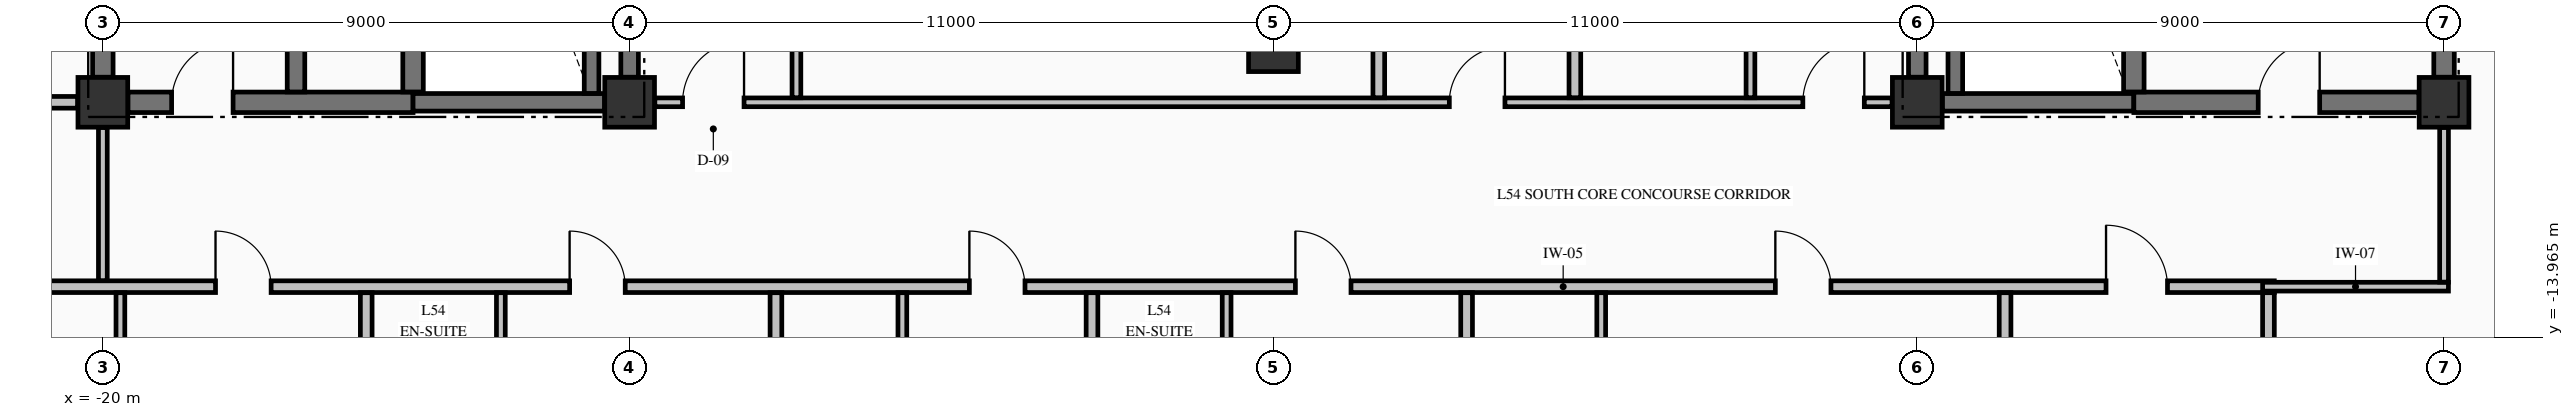
"""IFC4 building model, lengths in metres.
Left out: names, types, materials, properties, quantities, classifications, styles, units other than length and angle.
Written with IfcOpenShell. Run it as: python <this file> out.ifc"""

import sys

from ifc_helpers import new_model, si_unit, direction, frame, frame_2d, origin, origin_2d, place, context, subcontext, project, spatial, rectangle, extrude, element, fill, save


model = new_model("IFC4")
c1 = context("Model", 3, precision=1e-05, world=origin(), true_north=direction((0.0, 1.0)))
c2 = subcontext(c1, "Body", "Model", "MODEL_VIEW")
j1 = project(units=[si_unit("LENGTHUNIT", "METRE"), si_unit("PLANEANGLEUNIT", "RADIAN")], contexts=[c1])
p1 = place(None, origin())
s1 = spatial("IfcSite", under=j1, at=p1, CompositionType="ELEMENT")
p2 = place(p1, origin())
s2 = spatial("IfcBuilding", under=s1, at=p2, CompositionType="ELEMENT")
p3 = place(p2, frame((0.0, 0.0, 208.46)))
s3 = spatial("IfcBuildingStorey", under=s2, at=p3, CompositionType="ELEMENT", Elevation=208.46)
for number, where, z_axis, x_axis in (
    (1, (-20.0, -9.95, -0.25), (0.0, 0.0, 1.0), (1.0, 0.0, 0.0)),
    (2, (-11.0, -9.95, -0.25), (0.0, 0.0, 1.0), (1.0, 0.0, 0.0)),
    (3, (11.0, -9.95, -0.25), (0.0, 0.0, 1.0), (1.0, 0.0, 0.0)),
    (4, (20.0, -9.95, -0.25), (0.0, 0.0, 1.0), (1.0, 0.0, 0.0)),
    (5, (0.0, -9.0, -0.25), (0.0, 0.0, 1.0), (1.0, 0.0, 0.0)),
):
    element("IfcColumn", number, at=place(p3, frame(where, z_axis=z_axis, x_axis=x_axis)), inside=s3, PredefinedType="COLUMN", context=c2, shape_type="SweptSolid", body=[
        extrude(rectangle(XDim=0.85, YDim=0.85, at=origin_2d()), origin(), (0.0, 0.0, 1.0), 3.325),
    ])
p4 = place(p3, frame((-19.571, -9.95, 0.0), z_axis=(0.0, 0.0, 1.0), x_axis=(1.0, 0.0, 0.0)))
e6 = element("IfcWall", 6, at=p4, inside=s3, PredefinedType="SHEAR", context=c2, shape_type="SweptSolid", body=[
    extrude(rectangle(XDim=4.871, YDim=0.35, at=frame_2d((2.436, 0.0))), origin(), (0.0, 0.0, 1.0), 3.075),
])
p5 = place(p4, frame((0.746, 0.0, 0.0)))
e7 = element("IfcOpeningElement", 7, at=p5, cuts=e6, PredefinedType="OPENING", context=c2, shape_type="SweptSolid", body=[
    extrude(rectangle(XDim=1.05, YDim=2.15, at=frame_2d((0.525, 1.075))), frame((0.0, 0.185, 0.0), z_axis=(0.0, -1.0, 0.0), x_axis=(1.0, 0.0, 0.0)), (0.0, 0.0, 1.0), 0.37),
])
for number, where, z_axis, x_axis in (
    (8, (-14.7, -9.95, 0.0), (0.0, 0.0, 1.0), (1.0, 0.0, 0.0)),
    (9, (11.429, -9.95, 0.0), (0.0, 0.0, 1.0), (1.0, 0.0, 0.0)),
):
    element("IfcWall", number, at=place(p3, frame(where, z_axis=z_axis, x_axis=x_axis)), inside=s3, PredefinedType="SHEAR", context=c2, shape_type="SweptSolid", body=[
        extrude(rectangle(XDim=3.271, YDim=0.3, at=frame_2d((1.635, 0.0))), origin(), (0.0, 0.0, 1.0), 3.075),
    ])
p6 = place(p3, frame((14.7, -9.95, 0.0), z_axis=(0.0, 0.0, 1.0), x_axis=(1.0, 0.0, 0.0)))
e10 = element("IfcWall", 10, at=p6, inside=s3, PredefinedType="SHEAR", context=c2, shape_type="SweptSolid", body=[
    extrude(rectangle(XDim=4.871, YDim=0.35, at=frame_2d((2.436, 0.0))), origin(), (0.0, 0.0, 1.0), 3.075),
])
p7 = place(p6, frame((2.125, 0.0, 0.0)))
e11 = element("IfcOpeningElement", 11, at=p7, cuts=e10, PredefinedType="OPENING", context=c2, shape_type="SweptSolid", body=[
    extrude(rectangle(XDim=1.05, YDim=2.15, at=frame_2d((0.525, 1.075))), frame((0.0, 0.185, 0.0), z_axis=(0.0, -1.0, 0.0), x_axis=(1.0, 0.0, 0.0)), (0.0, 0.0, 1.0), 0.37),
])
p8 = place(p3, frame((-22.1, -13.1, 0.0), z_axis=(0.0, 0.0, 1.0), x_axis=(1.0, 0.0, 0.0)))
e12 = element("IfcWall", 12, at=p8, inside=s3, PredefinedType="PARTITIONING", context=c2, shape_type="SweptSolid", body=[
    extrude(rectangle(XDim=39.2, YDim=0.2, at=frame_2d((19.6, 0.0))), origin(), (0.0, 0.0, 1.0), 3.075),
])
p9 = place(p8, frame((4.025, 0.0, 0.0)))
e13 = element("IfcOpeningElement", 13, at=p9, cuts=e12, PredefinedType="OPENING", context=c2, shape_type="SweptSolid", body=[
    extrude(rectangle(XDim=0.95, YDim=2.15, at=frame_2d((0.475, 1.075))), frame((0.0, 0.11, 0.0), z_axis=(0.0, -1.0, 0.0), x_axis=(1.0, 0.0, 0.0)), (0.0, 0.0, 1.0), 0.22),
])
p10 = place(p8, frame((10.075, 0.0, 0.0)))
e14 = element("IfcOpeningElement", 14, at=p10, cuts=e12, PredefinedType="OPENING", context=c2, shape_type="SweptSolid", body=[
    extrude(rectangle(XDim=0.95, YDim=2.15, at=frame_2d((0.475, 1.075))), frame((0.0, 0.11, 0.0), z_axis=(0.0, -1.0, 0.0), x_axis=(1.0, 0.0, 0.0)), (0.0, 0.0, 1.0), 0.22),
])
p11 = place(p8, frame((16.905, 0.0, 0.0)))
e15 = element("IfcOpeningElement", 15, at=p11, cuts=e12, PredefinedType="OPENING", context=c2, shape_type="SweptSolid", body=[
    extrude(rectangle(XDim=0.95, YDim=2.15, at=frame_2d((0.475, 1.075))), frame((0.0, 0.11, 0.0), z_axis=(0.0, -1.0, 0.0), x_axis=(1.0, 0.0, 0.0)), (0.0, 0.0, 1.0), 0.22),
])
p12 = place(p8, frame((22.475, 0.0, 0.0)))
e16 = element("IfcOpeningElement", 16, at=p12, cuts=e12, PredefinedType="OPENING", context=c2, shape_type="SweptSolid", body=[
    extrude(rectangle(XDim=0.95, YDim=2.15, at=frame_2d((0.475, 1.075))), frame((0.0, 0.11, 0.0), z_axis=(0.0, -1.0, 0.0), x_axis=(1.0, 0.0, 0.0)), (0.0, 0.0, 1.0), 0.22),
])
p13 = place(p8, frame((30.675, 0.0, 0.0)))
e17 = element("IfcOpeningElement", 17, at=p13, cuts=e12, PredefinedType="OPENING", context=c2, shape_type="SweptSolid", body=[
    extrude(rectangle(XDim=0.95, YDim=2.15, at=frame_2d((0.475, 1.075))), frame((0.0, 0.11, 0.0), z_axis=(0.0, -1.0, 0.0), x_axis=(1.0, 0.0, 0.0)), (0.0, 0.0, 1.0), 0.22),
])
p14 = place(p8, frame((36.325, 0.0, 0.0)))
e18 = element("IfcOpeningElement", 18, at=p14, cuts=e12, PredefinedType="OPENING", context=c2, shape_type="SweptSolid", body=[
    extrude(rectangle(XDim=1.05, YDim=2.15, at=frame_2d((0.525, 1.075))), frame((0.0, 0.11, 0.0), z_axis=(0.0, -1.0, 0.0), x_axis=(1.0, 0.0, 0.0)), (0.0, 0.0, 1.0), 0.22),
])
p15 = place(p3, frame((16.9, -13.1, 0.0), z_axis=(0.0, 0.0, 1.0), x_axis=(1.0, 0.0, 0.0)))
e19 = element("IfcWall", 19, at=p15, inside=s3, PredefinedType="PARTITIONING", context=c2, shape_type="SweptSolid", body=[
    extrude(rectangle(XDim=3.175, YDim=0.15, at=frame_2d((1.587, 0.0))), origin(), (0.0, 0.0, 1.0), 3.075),
])
p16 = place(p3, frame((-26.835, -9.95, 0.0), z_axis=(0.0, 0.0, 1.0), x_axis=(1.0, 0.0, 0.0)))
e20 = element("IfcWall", 20, at=p16, inside=s3, PredefinedType="PARTITIONING", context=c2, shape_type="SweptSolid", body=[
    extrude(rectangle(XDim=6.404, YDim=0.2, at=frame_2d((3.202, 0.0))), origin(), (0.0, 0.0, 1.0), 3.075),
])
p17 = place(p3, frame((-10.569, -9.95, 0.0), z_axis=(0.0, 0.0, 1.0), x_axis=(1.0, 0.0, 0.0)))
e21 = element("IfcWall", 21, at=p17, inside=s3, PredefinedType="PARTITIONING", context=c2, shape_type="SweptSolid", body=[
    extrude(rectangle(XDim=21.138, YDim=0.15, at=frame_2d((10.569, 0.0))), origin(), (0.0, 0.0, 1.0), 3.075),
])
p18 = place(p17, frame((0.474, 0.0, 0.0)))
e22 = element("IfcOpeningElement", 22, at=p18, cuts=e21, PredefinedType="OPENING", context=c2, shape_type="SweptSolid", body=[
    extrude(rectangle(XDim=1.05, YDim=2.15, at=frame_2d((0.525, 1.075))), frame((0.0, 0.085, 0.0), z_axis=(0.0, -1.0, 0.0), x_axis=(1.0, 0.0, 0.0)), (0.0, 0.0, 1.0), 0.17),
])
p19 = place(p17, frame((19.614, 0.0, 0.0)))
e23 = element("IfcOpeningElement", 23, at=p19, cuts=e21, PredefinedType="OPENING", context=c2, shape_type="SweptSolid", body=[
    extrude(rectangle(XDim=1.05, YDim=2.15, at=frame_2d((0.525, 1.075))), frame((0.0, 0.085, 0.0), z_axis=(0.0, -1.0, 0.0), x_axis=(1.0, 0.0, 0.0)), (0.0, 0.0, 1.0), 0.17),
])
p20 = place(p17, frame((13.574, 0.0, 0.0)))
e24 = element("IfcOpeningElement", 24, at=p20, cuts=e21, PredefinedType="OPENING", context=c2, shape_type="SweptSolid", body=[
    extrude(rectangle(XDim=0.95, YDim=2.15, at=frame_2d((0.475, 1.075))), frame((0.0, 0.085, 0.0), z_axis=(0.0, -1.0, 0.0), x_axis=(1.0, 0.0, 0.0)), (0.0, 0.0, 1.0), 0.17),
])
p21 = place(p3, frame((-20.0, -9.521, 0.0), z_axis=(0.0, 0.0, 1.0), x_axis=(0.0, 1.0, 0.0)))
e25 = element("IfcWall", 25, at=p21, inside=s3, PredefinedType="SHEAR", context=c2, shape_type="SweptSolid", body=[
    extrude(rectangle(XDim=9.092, YDim=0.35, at=frame_2d((4.546, 0.0))), origin(), (0.0, 0.0, 1.0), 3.075),
])
p22 = place(p3, frame((-16.7, -9.773, 0.0), z_axis=(0.0, 0.0, 1.0), x_axis=(0.0, 1.0, 0.0)))
e26 = element("IfcWall", 26, at=p22, inside=s3, PredefinedType="SHEAR", context=c2, shape_type="SweptSolid", body=[
    extrude(rectangle(XDim=9.371, YDim=0.3, at=frame_2d((4.686, 0.0))), origin(), (0.0, 0.0, 1.0), 3.075),
])
p23 = place(p3, frame((-14.7, -9.773, 0.0), z_axis=(0.0, 0.0, 1.0), x_axis=(0.0, 1.0, 0.0)))
e27 = element("IfcWall", 27, at=p23, inside=s3, PredefinedType="SHEAR", context=c2, shape_type="SweptSolid", body=[
    extrude(rectangle(XDim=9.371, YDim=0.35, at=frame_2d((4.686, 0.0))), origin(), (0.0, 0.0, 1.0), 3.075),
])
p24 = place(p3, frame((-11.65, -9.798, 0.0), z_axis=(0.0, 0.0, 1.0), x_axis=(0.0, 1.0, 0.0)))
e28 = element("IfcWall", 28, at=p24, inside=s3, PredefinedType="SOLIDWALL", context=c2, shape_type="SweptSolid", body=[
    extrude(rectangle(XDim=9.396, YDim=0.25, at=frame_2d((4.698, 0.0))), origin(), (0.0, 0.0, 1.0), 3.075),
])
for number, where, z_axis, x_axis in (
    (29, (-11.0, -9.521, 0.0), (0.0, 0.0, 1.0), (0.0, 1.0, 0.0)),
    (30, (11.0, -9.521, 0.0), (0.0, 0.0, 1.0), (0.0, 1.0, 0.0)),
):
    element("IfcWall", number, at=place(p3, frame(where, z_axis=z_axis, x_axis=x_axis)), inside=s3, PredefinedType="SHEAR", context=c2, shape_type="SweptSolid", body=[
        extrude(rectangle(XDim=9.092, YDim=0.3, at=frame_2d((4.546, 0.0))), origin(), (0.0, 0.0, 1.0), 3.075),
    ])
p25 = place(p3, frame((11.65, -9.798, 0.0), z_axis=(0.0, 0.0, 1.0), x_axis=(0.0, 1.0, 0.0)))
e31 = element("IfcWall", 31, at=p25, inside=s3, PredefinedType="SOLIDWALL", context=c2, shape_type="SweptSolid", body=[
    extrude(rectangle(XDim=9.396, YDim=0.25, at=frame_2d((4.698, 0.0))), origin(), (0.0, 0.0, 1.0), 3.075),
])
p26 = place(p3, frame((14.7, -9.773, 0.0), z_axis=(0.0, 0.0, 1.0), x_axis=(0.0, 1.0, 0.0)))
e32 = element("IfcWall", 32, at=p26, inside=s3, PredefinedType="SHEAR", context=c2, shape_type="SweptSolid", body=[
    extrude(rectangle(XDim=9.371, YDim=0.35, at=frame_2d((4.686, 0.0))), origin(), (0.0, 0.0, 1.0), 3.075),
])
p27 = place(p3, frame((20.0, -9.521, 0.0), z_axis=(0.0, 0.0, 1.0), x_axis=(0.0, 1.0, 0.0)))
e33 = element("IfcWall", 33, at=p27, inside=s3, PredefinedType="SHEAR", context=c2, shape_type="SweptSolid", body=[
    extrude(rectangle(XDim=9.092, YDim=0.35, at=frame_2d((4.546, 0.0))), origin(), (0.0, 0.0, 1.0), 3.075),
])
p28 = place(p3, frame((-20.0, -12.997, 0.0), z_axis=(0.0, 0.0, 1.0), x_axis=(0.0, 1.0, 0.0)))
e34 = element("IfcWall", 34, at=p28, inside=s3, PredefinedType="PARTITIONING", context=c2, shape_type="SweptSolid", body=[
    extrude(rectangle(XDim=2.616, YDim=0.15, at=frame_2d((1.308, 0.0))), origin(), (0.0, 0.0, 1.0), 2.267),
])
p29 = place(p3, frame((-19.7, -15.272, 0.0), z_axis=(0.0, 0.0, 1.0), x_axis=(0.0, 1.0, 0.0)))
e35 = element("IfcWall", 35, at=p29, inside=s3, PredefinedType="PARTITIONING", context=c2, shape_type="SweptSolid", body=[
    extrude(rectangle(XDim=2.069, YDim=0.15, at=frame_2d((1.035, 0.0))), origin(), (0.0, 0.0, 1.0), 2.267),
])
p30 = place(p3, frame((-15.5, -15.972, 0.0), z_axis=(0.0, 0.0, 1.0), x_axis=(0.0, 1.0, 0.0)))
e36 = element("IfcWall", 36, at=p30, inside=s3, PredefinedType="PARTITIONING", context=c2, shape_type="SweptSolid", body=[
    extrude(rectangle(XDim=2.769, YDim=0.2, at=frame_2d((1.385, 0.0))), origin(), (0.0, 0.0, 1.0), 3.075),
])
p31 = place(p3, frame((-13.2, -15.972, 0.0), z_axis=(0.0, 0.0, 1.0), x_axis=(0.0, 1.0, 0.0)))
e37 = element("IfcWall", 37, at=p31, inside=s3, PredefinedType="PARTITIONING", context=c2, shape_type="SweptSolid", body=[
    extrude(rectangle(XDim=2.769, YDim=0.15, at=frame_2d((1.385, 0.0))), origin(), (0.0, 0.0, 1.0), 3.075),
])
p32 = place(p3, frame((-8.5, -15.272, 0.0), z_axis=(0.0, 0.0, 1.0), x_axis=(0.0, 1.0, 0.0)))
e38 = element("IfcWall", 38, at=p32, inside=s3, PredefinedType="PARTITIONING", context=c2, shape_type="SweptSolid", body=[
    extrude(rectangle(XDim=2.069, YDim=0.2, at=frame_2d((1.035, 0.0))), origin(), (0.0, 0.0, 1.0), 3.075),
])
p33 = place(p3, frame((-8.15, -9.872, 0.0), z_axis=(0.0, 0.0, 1.0), x_axis=(0.0, 1.0, 0.0)))
e39 = element("IfcWall", 39, at=p33, inside=s3, PredefinedType="PARTITIONING", context=c2, shape_type="SweptSolid", body=[
    extrude(rectangle(XDim=6.369, YDim=0.15, at=frame_2d((3.185, 0.0))), origin(), (0.0, 0.0, 1.0), 3.075),
])
p34 = place(p33, frame((2.702, 0.0, 0.0)))
e40 = element("IfcOpeningElement", 40, at=p34, cuts=e39, PredefinedType="OPENING", context=c2, shape_type="SweptSolid", body=[
    extrude(rectangle(XDim=1.0, YDim=2.15, at=frame_2d((0.5, 1.075))), frame((0.0, 0.085, 0.0), z_axis=(0.0, -1.0, 0.0), x_axis=(1.0, 0.0, 0.0)), (0.0, 0.0, 1.0), 0.17),
])
p35 = place(p3, frame((-6.34, -15.272, 0.0), z_axis=(0.0, 0.0, 1.0), x_axis=(0.0, 1.0, 0.0)))
e41 = element("IfcWall", 41, at=p35, inside=s3, PredefinedType="PARTITIONING", context=c2, shape_type="SweptSolid", body=[
    extrude(rectangle(XDim=2.069, YDim=0.15, at=frame_2d((1.035, 0.0))), origin(), (0.0, 0.0, 1.0), 3.075),
])
p36 = place(p3, frame((-3.1, -15.972, 0.0), z_axis=(0.0, 0.0, 1.0), x_axis=(0.0, 1.0, 0.0)))
e42 = element("IfcWall", 42, at=p36, inside=s3, PredefinedType="PARTITIONING", context=c2, shape_type="SweptSolid", body=[
    extrude(rectangle(XDim=2.769, YDim=0.2, at=frame_2d((1.385, 0.0))), origin(), (0.0, 0.0, 1.0), 3.075),
])
p37 = place(p3, frame((-0.8, -15.972, 0.0), z_axis=(0.0, 0.0, 1.0), x_axis=(0.0, 1.0, 0.0)))
e43 = element("IfcWall", 43, at=p37, inside=s3, PredefinedType="PARTITIONING", context=c2, shape_type="SweptSolid", body=[
    extrude(rectangle(XDim=2.769, YDim=0.15, at=frame_2d((1.385, 0.0))), origin(), (0.0, 0.0, 1.0), 3.075),
])
p38 = place(p3, frame((1.8, -9.872, 0.0), z_axis=(0.0, 0.0, 1.0), x_axis=(0.0, 1.0, 0.0)))
e44 = element("IfcWall", 44, at=p38, inside=s3, PredefinedType="PARTITIONING", context=c2, shape_type="SweptSolid", body=[
    extrude(rectangle(XDim=4.569, YDim=0.2, at=frame_2d((2.285, 0.0))), origin(), (0.0, 0.0, 1.0), 3.075),
])
p39 = place(p3, frame((3.3, -15.272, 0.0), z_axis=(0.0, 0.0, 1.0), x_axis=(0.0, 1.0, 0.0)))
e45 = element("IfcWall", 45, at=p39, inside=s3, PredefinedType="PARTITIONING", context=c2, shape_type="SweptSolid", body=[
    extrude(rectangle(XDim=2.069, YDim=0.2, at=frame_2d((1.035, 0.0))), origin(), (0.0, 0.0, 1.0), 3.075),
])
p40 = place(p3, frame((5.15, -9.872, 0.0), z_axis=(0.0, 0.0, 1.0), x_axis=(0.0, 1.0, 0.0)))
e46 = element("IfcWall", 46, at=p40, inside=s3, PredefinedType="PARTITIONING", context=c2, shape_type="SweptSolid", body=[
    extrude(rectangle(XDim=4.569, YDim=0.2, at=frame_2d((2.285, 0.0))), origin(), (0.0, 0.0, 1.0), 3.075),
])
p41 = place(p3, frame((5.6, -15.272, 0.0), z_axis=(0.0, 0.0, 1.0), x_axis=(0.0, 1.0, 0.0)))
e47 = element("IfcWall", 47, at=p41, inside=s3, PredefinedType="PARTITIONING", context=c2, shape_type="SweptSolid", body=[
    extrude(rectangle(XDim=2.069, YDim=0.15, at=frame_2d((1.035, 0.0))), origin(), (0.0, 0.0, 1.0), 3.075),
])
p42 = place(p3, frame((8.15, -9.872, 0.0), z_axis=(0.0, 0.0, 1.0), x_axis=(0.0, 1.0, 0.0)))
e48 = element("IfcWall", 48, at=p42, inside=s3, PredefinedType="PARTITIONING", context=c2, shape_type="SweptSolid", body=[
    extrude(rectangle(XDim=4.569, YDim=0.15, at=frame_2d((2.285, 0.0))), origin(), (0.0, 0.0, 1.0), 3.075),
])
p43 = place(p42, frame((1.847, 0.0, 0.0)))
e49 = element("IfcOpeningElement", 49, at=p43, cuts=e48, PredefinedType="OPENING", context=c2, shape_type="SweptSolid", body=[
    extrude(rectangle(XDim=0.95, YDim=2.15, at=frame_2d((0.475, 1.075))), frame((0.0, 0.085, 0.0), z_axis=(0.0, -1.0, 0.0), x_axis=(1.0, 0.0, 0.0)), (0.0, 0.0, 1.0), 0.17),
])
p44 = place(p3, frame((12.5, -24.335, 0.0), z_axis=(0.0, 0.0, 1.0), x_axis=(0.0, 1.0, 0.0)))
e50 = element("IfcWall", 50, at=p44, inside=s3, PredefinedType="PARTITIONING", context=c2, shape_type="SweptSolid", body=[
    extrude(rectangle(XDim=11.132, YDim=0.2, at=frame_2d((5.566, 0.0))), origin(), (0.0, 0.0, 1.0), 3.075),
])
p45 = place(p3, frame((17.0, -18.994, 0.0), z_axis=(0.0, 0.0, 1.0), x_axis=(0.0, 1.0, 0.0)))
e51 = element("IfcWall", 51, at=p45, inside=s3, PredefinedType="PARTITIONING", context=c2, shape_type="SweptSolid", body=[
    extrude(rectangle(XDim=5.791, YDim=0.2, at=frame_2d((2.896, 0.0))), origin(), (0.0, 0.0, 1.0), 3.075),
])
p46 = place(p3, frame((20.0, -13.022, 0.0), z_axis=(0.0, 0.0, 1.0), x_axis=(0.0, 1.0, 0.0)))
e52 = element("IfcWall", 52, at=p46, inside=s3, PredefinedType="PARTITIONING", context=c2, shape_type="SweptSolid", body=[
    extrude(rectangle(XDim=2.641, YDim=0.15, at=frame_2d((1.32, 0.0))), origin(), (0.0, 0.0, 1.0), 2.267),
])
p47 = place(p5, origin())
e53 = element("IfcDoor", 53, at=p47, inside=s3, OperationType="SINGLE_SWING_RIGHT", PredefinedType="DOOR", context=c2, shape_type="SweptSolid", body=[
    extrude(rectangle(XDim=1.05, YDim=2.15, at=frame_2d((0.525, 1.075))), frame((0.0, 0.025, 0.0), z_axis=(0.0, -1.0, 0.0), x_axis=(1.0, 0.0, 0.0)), (0.0, 0.0, 1.0), 0.05),
])
fill(e7, e53)
p48 = place(p7, origin())
e54 = element("IfcDoor", 54, at=p48, inside=s3, OperationType="SINGLE_SWING_RIGHT", PredefinedType="DOOR", context=c2, shape_type="SweptSolid", body=[
    extrude(rectangle(XDim=1.05, YDim=2.15, at=frame_2d((0.525, 1.075))), frame((0.0, 0.025, 0.0), z_axis=(0.0, -1.0, 0.0), x_axis=(1.0, 0.0, 0.0)), (0.0, 0.0, 1.0), 0.05),
])
fill(e11, e54)
p49 = place(p18, origin())
e55 = element("IfcDoor", 55, at=p49, inside=s3, OperationType="SINGLE_SWING_RIGHT", PredefinedType="DOOR", context=c2, shape_type="SweptSolid", body=[
    extrude(rectangle(XDim=1.05, YDim=2.15, at=frame_2d((0.525, 1.075))), frame((0.0, 0.025, 0.0), z_axis=(0.0, -1.0, 0.0), x_axis=(1.0, 0.0, 0.0)), (0.0, 0.0, 1.0), 0.05),
])
fill(e22, e55)
p50 = place(p19, origin())
e56 = element("IfcDoor", 56, at=p50, inside=s3, OperationType="SINGLE_SWING_RIGHT", PredefinedType="DOOR", context=c2, shape_type="SweptSolid", body=[
    extrude(rectangle(XDim=1.05, YDim=2.15, at=frame_2d((0.525, 1.075))), frame((0.0, 0.025, 0.0), z_axis=(0.0, -1.0, 0.0), x_axis=(1.0, 0.0, 0.0)), (0.0, 0.0, 1.0), 0.05),
])
fill(e23, e56)
p51 = place(p9, origin())
e57 = element("IfcDoor", 57, at=p51, inside=s3, OperationType="SINGLE_SWING_LEFT", PredefinedType="DOOR", context=c2, shape_type="SweptSolid", body=[
    extrude(rectangle(XDim=0.95, YDim=2.15, at=frame_2d((0.475, 1.075))), frame((0.0, 0.025, 0.0), z_axis=(0.0, -1.0, 0.0), x_axis=(1.0, 0.0, 0.0)), (0.0, 0.0, 1.0), 0.05),
])
fill(e13, e57)
p52 = place(p10, origin())
e58 = element("IfcDoor", 58, at=p52, inside=s3, OperationType="SINGLE_SWING_LEFT", PredefinedType="DOOR", context=c2, shape_type="SweptSolid", body=[
    extrude(rectangle(XDim=0.95, YDim=2.15, at=frame_2d((0.475, 1.075))), frame((0.0, 0.025, 0.0), z_axis=(0.0, -1.0, 0.0), x_axis=(1.0, 0.0, 0.0)), (0.0, 0.0, 1.0), 0.05),
])
fill(e14, e58)
p53 = place(p11, origin())
e59 = element("IfcDoor", 59, at=p53, inside=s3, OperationType="SINGLE_SWING_LEFT", PredefinedType="DOOR", context=c2, shape_type="SweptSolid", body=[
    extrude(rectangle(XDim=0.95, YDim=2.15, at=frame_2d((0.475, 1.075))), frame((0.0, 0.025, 0.0), z_axis=(0.0, -1.0, 0.0), x_axis=(1.0, 0.0, 0.0)), (0.0, 0.0, 1.0), 0.05),
])
fill(e15, e59)
p54 = place(p12, origin())
e60 = element("IfcDoor", 60, at=p54, inside=s3, OperationType="SINGLE_SWING_LEFT", PredefinedType="DOOR", context=c2, shape_type="SweptSolid", body=[
    extrude(rectangle(XDim=0.95, YDim=2.15, at=frame_2d((0.475, 1.075))), frame((0.0, 0.025, 0.0), z_axis=(0.0, -1.0, 0.0), x_axis=(1.0, 0.0, 0.0)), (0.0, 0.0, 1.0), 0.05),
])
fill(e16, e60)
p55 = place(p13, origin())
e61 = element("IfcDoor", 61, at=p55, inside=s3, OperationType="SINGLE_SWING_LEFT", PredefinedType="DOOR", context=c2, shape_type="SweptSolid", body=[
    extrude(rectangle(XDim=0.95, YDim=2.15, at=frame_2d((0.475, 1.075))), frame((0.0, 0.025, 0.0), z_axis=(0.0, -1.0, 0.0), x_axis=(1.0, 0.0, 0.0)), (0.0, 0.0, 1.0), 0.05),
])
fill(e17, e61)
p56 = place(p14, origin())
e62 = element("IfcDoor", 62, at=p56, inside=s3, OperationType="SINGLE_SWING_LEFT", PredefinedType="DOOR", context=c2, shape_type="SweptSolid", body=[
    extrude(rectangle(XDim=1.05, YDim=2.15, at=frame_2d((0.525, 1.075))), frame((0.0, 0.025, 0.0), z_axis=(0.0, -1.0, 0.0), x_axis=(1.0, 0.0, 0.0)), (0.0, 0.0, 1.0), 0.05),
])
fill(e18, e62)
p57 = place(p20, origin())
e63 = element("IfcDoor", 63, at=p57, inside=s3, OperationType="SINGLE_SWING_RIGHT", PredefinedType="DOOR", context=c2, shape_type="SweptSolid", body=[
    extrude(rectangle(XDim=0.95, YDim=2.15, at=frame_2d((0.475, 1.075))), frame((0.0, 0.025, 0.0), z_axis=(0.0, -1.0, 0.0), x_axis=(1.0, 0.0, 0.0)), (0.0, 0.0, 1.0), 0.05),
])
fill(e24, e63)
save(model, sys.argv[1])
